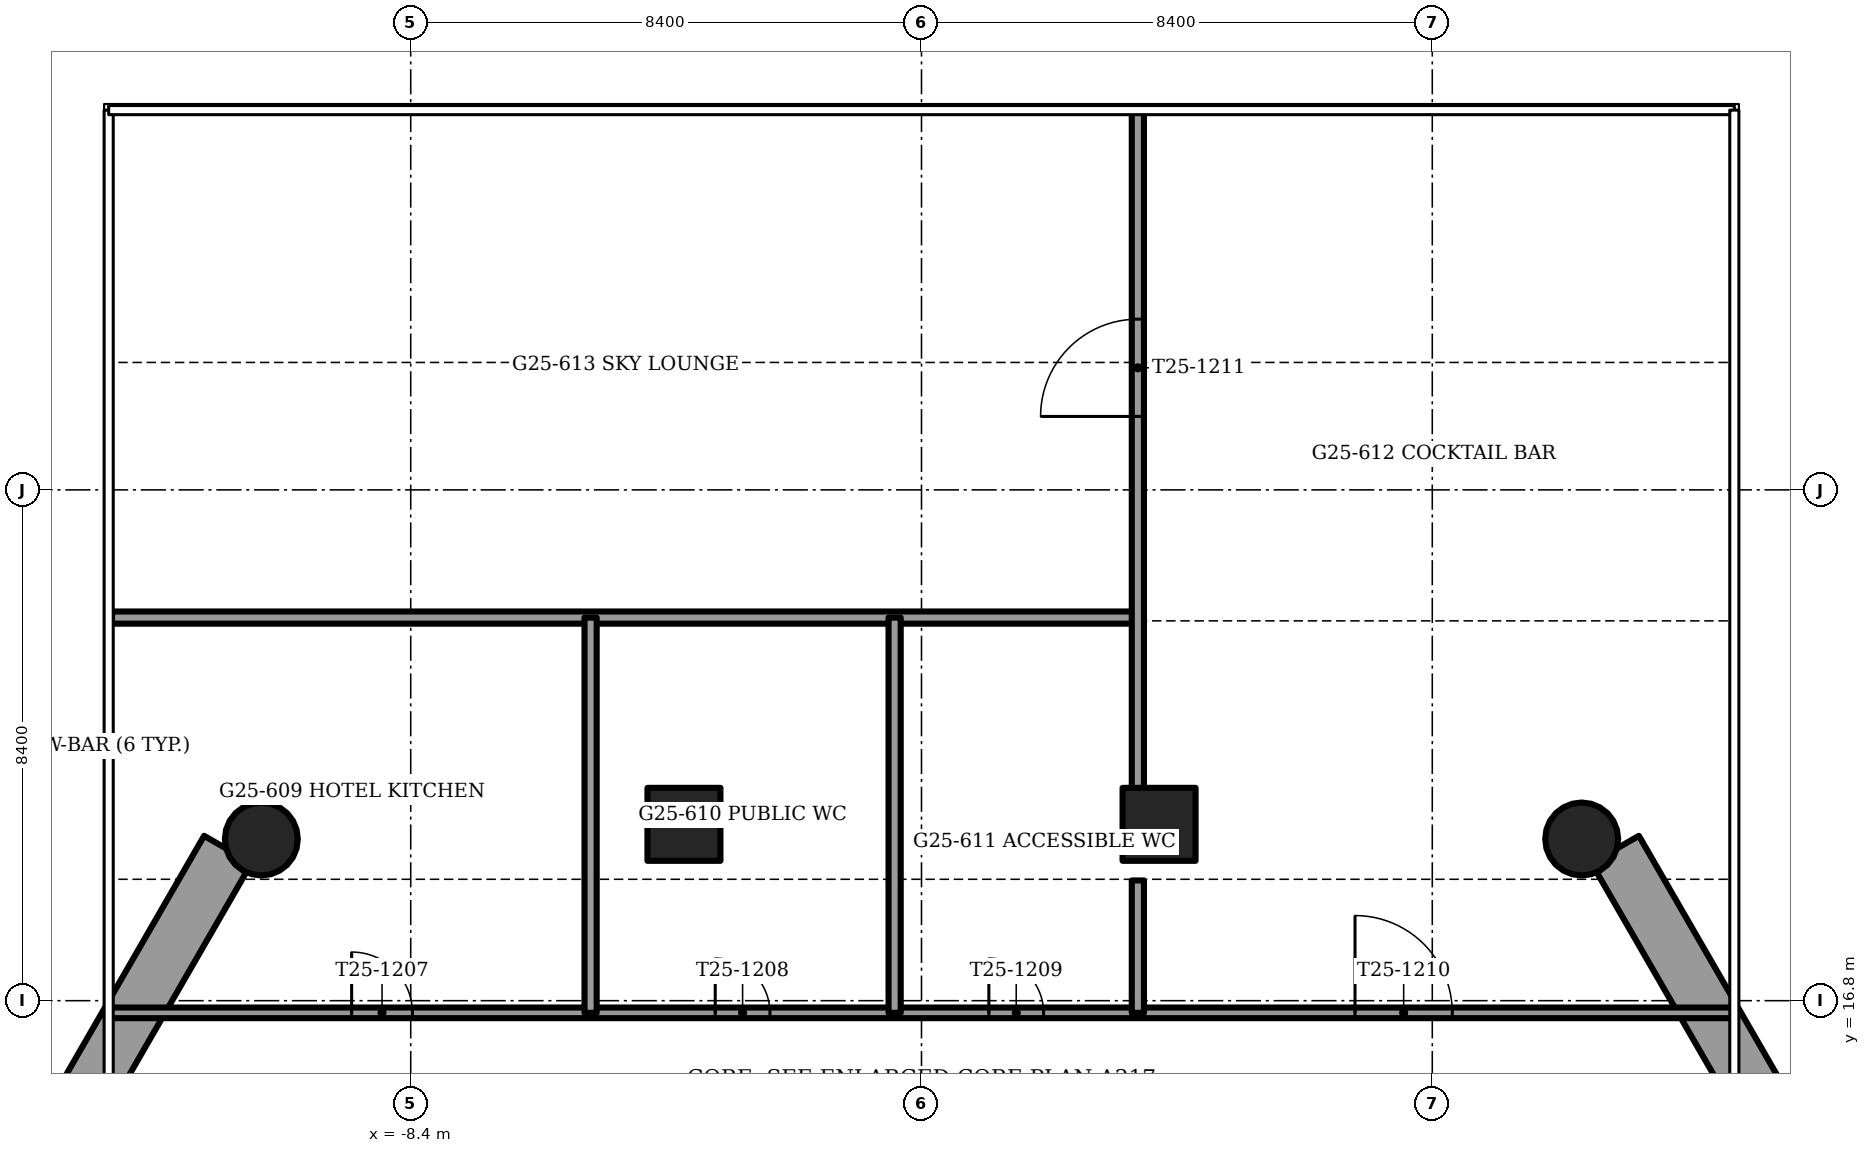
"""IFC4 building model, lengths in metres.
Left out: names, types, materials, properties, quantities, classifications, styles, units other than length and angle.
Written with IfcOpenShell. Run it as: python <this file> out.ifc"""

import sys

from ifc_helpers import new_model, si_unit, direction, frame, frame_2d, origin, origin_2d, place, context, subcontext, project, spatial, rectangle, circle, extrude, element, fill, save


model = new_model("IFC4")
c1 = context("Model", 3, precision=1e-05, world=origin(), true_north=direction((0.0, 1.0)))
c2 = subcontext(c1, "Body", "Model", "MODEL_VIEW")
j1 = project(units=[si_unit("LENGTHUNIT", "METRE"), si_unit("PLANEANGLEUNIT", "RADIAN")], contexts=[c1])
p1 = place(None, origin())
s1 = spatial("IfcSite", under=j1, at=p1, CompositionType="ELEMENT")
p2 = place(p1, origin())
s2 = spatial("IfcBuilding", under=s1, at=p2, CompositionType="ELEMENT")
p3 = place(p2, frame((0.0, 0.0, 100.5)))
s3 = spatial("IfcBuildingStorey", under=s2, at=p3, CompositionType="ELEMENT", Elevation=100.5)
for number, where, z_axis, x_axis in (
    (1, (-10.857, 19.459, -1.2), (0.0, 0.0, 1.0), (1.0, 0.0, 0.0)),
    (2, (10.857, 19.459, -1.2), (0.0, 0.0, 1.0), (1.0, 0.0, 0.0)),
):
    element("IfcColumn", number, at=place(p3, frame(where, z_axis=z_axis, x_axis=x_axis)), inside=s3, PredefinedType="COLUMN", context=c2, shape_type="SweptSolid", body=[
        extrude(circle(Radius=0.6, at=origin_2d()), origin(), (0.0, 0.0, 1.0), 3.75),
    ])
for number, where, z_axis, x_axis in (
    (3, (3.907, 19.7, -1.2), (0.0, 0.0, 1.0), (1.0, 0.0, 0.0)),
    (4, (-3.907, 19.7, -1.2), (0.0, 0.0, 1.0), (1.0, 0.0, 0.0)),
):
    element("IfcColumn", number, at=place(p3, frame(where, z_axis=z_axis, x_axis=x_axis)), inside=s3, PredefinedType="COLUMN", context=c2, shape_type="SweptSolid", body=[
        extrude(rectangle(XDim=1.2, YDim=1.2, at=origin_2d()), origin(), (0.0, 0.0, 1.0), 3.75),
    ])
for number, where, z_axis, x_axis in (
    (5, (-11.408, 19.286, 0.0), (0.0, 0.0, 1.0), (-0.5, -0.866, 0.0)),
    (6, (14.669, 13.638, 0.0), (0.0, 0.0, 1.0), (-0.5, 0.866, 0.0)),
):
    element("IfcWall", number, at=place(p3, frame(where, z_axis=z_axis, x_axis=x_axis)), inside=s3, PredefinedType="PARAPET", context=c2, shape_type="SweptSolid", body=[
        extrude(rectangle(XDim=6.522, YDim=0.9, at=frame_2d((3.261, 0.0))), origin(), (0.0, 0.0, 1.0), 1.1),
    ])
p4 = place(p3, frame((-13.348, 16.6, 0.0), z_axis=(0.0, 0.0, 1.0), x_axis=(1.0, 0.0, 0.0)))
e7 = element("IfcWall", 7, at=p4, inside=s3, PredefinedType="PARTITIONING", context=c2, shape_type="SweptSolid", body=[
    extrude(rectangle(XDim=26.696, YDim=0.175, at=frame_2d((13.348, 0.0))), origin(), (0.0, 0.0, 1.0), 2.55),
])
p5 = place(p4, frame((3.977, 0.0, 0.0)))
e8 = element("IfcOpeningElement", 8, at=p5, cuts=e7, PredefinedType="OPENING", context=c2, shape_type="SweptSolid", body=[
    extrude(rectangle(XDim=1.0, YDim=2.1, at=frame_2d((0.5, 1.05))), frame((0.0, 0.087, 0.0), z_axis=(0.0, -1.0, 0.0), x_axis=(1.0, 0.0, 0.0)), (0.0, 0.0, 1.0), 0.175),
])
p6 = place(p4, frame((9.956, 0.0, 0.0)))
e9 = element("IfcOpeningElement", 9, at=p6, cuts=e7, PredefinedType="OPENING", context=c2, shape_type="SweptSolid", body=[
    extrude(rectangle(XDim=0.9, YDim=2.1, at=frame_2d((0.45, 1.05))), frame((0.0, 0.087, 0.0), z_axis=(0.0, -1.0, 0.0), x_axis=(1.0, 0.0, 0.0)), (0.0, 0.0, 1.0), 0.175),
])
p7 = place(p4, frame((14.456, 0.0, 0.0)))
e10 = element("IfcOpeningElement", 10, at=p7, cuts=e7, PredefinedType="OPENING", context=c2, shape_type="SweptSolid", body=[
    extrude(rectangle(XDim=0.9, YDim=2.1, at=frame_2d((0.45, 1.05))), frame((0.0, 0.087, 0.0), z_axis=(0.0, -1.0, 0.0), x_axis=(1.0, 0.0, 0.0)), (0.0, 0.0, 1.0), 0.175),
])
p8 = place(p4, frame((20.478, 0.0, 0.0)))
e11 = element("IfcOpeningElement", 11, at=p8, cuts=e7, PredefinedType="OPENING", context=c2, shape_type="SweptSolid", body=[
    extrude(rectangle(XDim=1.6, YDim=2.1, at=frame_2d((0.8, 1.05))), frame((0.0, 0.087, 0.0), z_axis=(0.0, -1.0, 0.0), x_axis=(1.0, 0.0, 0.0)), (0.0, 0.0, 1.0), 0.175),
])
p9 = place(p3, frame((-13.312, 23.1, 0.0), z_axis=(0.0, 0.0, 1.0), x_axis=(1.0, 0.0, 0.0)))
e12 = element("IfcWall", 12, at=p9, inside=s3, PredefinedType="PARTITIONING", context=c2, shape_type="SweptSolid", body=[
    extrude(rectangle(XDim=16.87, YDim=0.2, at=frame_2d((8.435, 0.0))), origin(), (0.0, 0.0, 1.0), 2.828),
])
for number, where, z_axis, x_axis in (
    (13, (-5.442, 16.6, 0.0), (0.0, 0.0, 1.0), (0.0, 1.0, 0.0)),
    (14, (-0.442, 16.6, 0.0), (0.0, 0.0, 1.0), (0.0, 1.0, 0.0)),
):
    element("IfcWall", number, at=place(p3, frame(where, z_axis=z_axis, x_axis=x_axis)), inside=s3, PredefinedType="PARTITIONING", context=c2, shape_type="SweptSolid", body=[
        extrude(rectangle(XDim=6.5, YDim=0.2, at=frame_2d((3.25, 0.0))), origin(), (0.0, 0.0, 1.0), 2.828),
    ])
p10 = place(p3, frame((3.558, 16.6, 0.0), z_axis=(0.0, 0.0, 1.0), x_axis=(0.0, 1.0, 0.0)))
e15 = element("IfcWall", 15, at=p10, inside=s3, PredefinedType="PARTITIONING", context=c2, shape_type="SweptSolid", body=[
    extrude(rectangle(XDim=2.177, YDim=0.2, at=frame_2d((1.088, 0.0))), origin(), (0.0, 0.0, 1.0), 3.45),
])
p11 = place(p3, frame((3.558, 19.968, 0.0), z_axis=(0.0, 0.0, 1.0), x_axis=(0.0, 1.0, 0.0)))
e16 = element("IfcWall", 16, at=p11, inside=s3, PredefinedType="PARTITIONING", context=c2, shape_type="SweptSolid", body=[
    extrude(rectangle(XDim=11.458, YDim=0.2, at=frame_2d((5.729, 0.0))), origin(), (0.0, 0.0, 1.0), 2.828),
])
p12 = place(p11, frame((6.439, 0.0, 0.0)))
e17 = element("IfcOpeningElement", 17, at=p12, cuts=e16, PredefinedType="OPENING", context=c2, shape_type="SweptSolid", body=[
    extrude(rectangle(XDim=1.6, YDim=2.1, at=frame_2d((0.8, 1.05))), frame((0.0, 0.1, 0.0), z_axis=(0.0, -1.0, 0.0), x_axis=(1.0, 0.0, 0.0)), (0.0, 0.0, 1.0), 0.2),
])
p13 = place(p5, origin())
e18 = element("IfcDoor", 18, at=p13, inside=s3, OperationType="SINGLE_SWING_LEFT", PredefinedType="DOOR", context=c2, shape_type="SweptSolid", body=[
    extrude(rectangle(XDim=1.0, YDim=2.1, at=frame_2d((0.5, 1.05))), frame((0.0, 0.025, 0.0), z_axis=(0.0, -1.0, 0.0), x_axis=(1.0, 0.0, 0.0)), (0.0, 0.0, 1.0), 0.05),
])
fill(e8, e18)
p14 = place(p6, origin())
e19 = element("IfcDoor", 19, at=p14, inside=s3, OperationType="SINGLE_SWING_RIGHT", PredefinedType="DOOR", context=c2, shape_type="SweptSolid", body=[
    extrude(rectangle(XDim=0.9, YDim=2.1, at=frame_2d((0.45, 1.05))), frame((0.0, 0.025, 0.0), z_axis=(0.0, -1.0, 0.0), x_axis=(1.0, 0.0, 0.0)), (0.0, 0.0, 1.0), 0.05),
])
fill(e9, e19)
p15 = place(p7, origin())
e20 = element("IfcDoor", 20, at=p15, inside=s3, OperationType="SINGLE_SWING_LEFT", PredefinedType="DOOR", context=c2, shape_type="SweptSolid", body=[
    extrude(rectangle(XDim=0.9, YDim=2.1, at=frame_2d((0.45, 1.05))), frame((0.0, 0.025, 0.0), z_axis=(0.0, -1.0, 0.0), x_axis=(1.0, 0.0, 0.0)), (0.0, 0.0, 1.0), 0.05),
])
fill(e10, e20)
p16 = place(p8, origin())
e21 = element("IfcDoor", 21, at=p16, inside=s3, OperationType="DOUBLE_DOOR_SINGLE_SWING", PredefinedType="DOOR", context=c2, shape_type="SweptSolid", body=[
    extrude(rectangle(XDim=1.6, YDim=2.1, at=frame_2d((0.8, 1.05))), frame((0.0, 0.025, 0.0), z_axis=(0.0, -1.0, 0.0), x_axis=(1.0, 0.0, 0.0)), (0.0, 0.0, 1.0), 0.05),
])
fill(e11, e21)
p17 = place(p12, origin())
e22 = element("IfcDoor", 22, at=p17, inside=s3, OperationType="DOUBLE_DOOR_SINGLE_SWING", PredefinedType="DOOR", context=c2, shape_type="SweptSolid", body=[
    extrude(rectangle(XDim=1.6, YDim=2.1, at=frame_2d((0.8, 1.05))), frame((0.0, 0.025, 0.0), z_axis=(0.0, -1.0, 0.0), x_axis=(1.0, 0.0, 0.0)), (0.0, 0.0, 1.0), 0.05),
])
fill(e17, e22)
save(model, sys.argv[1])
